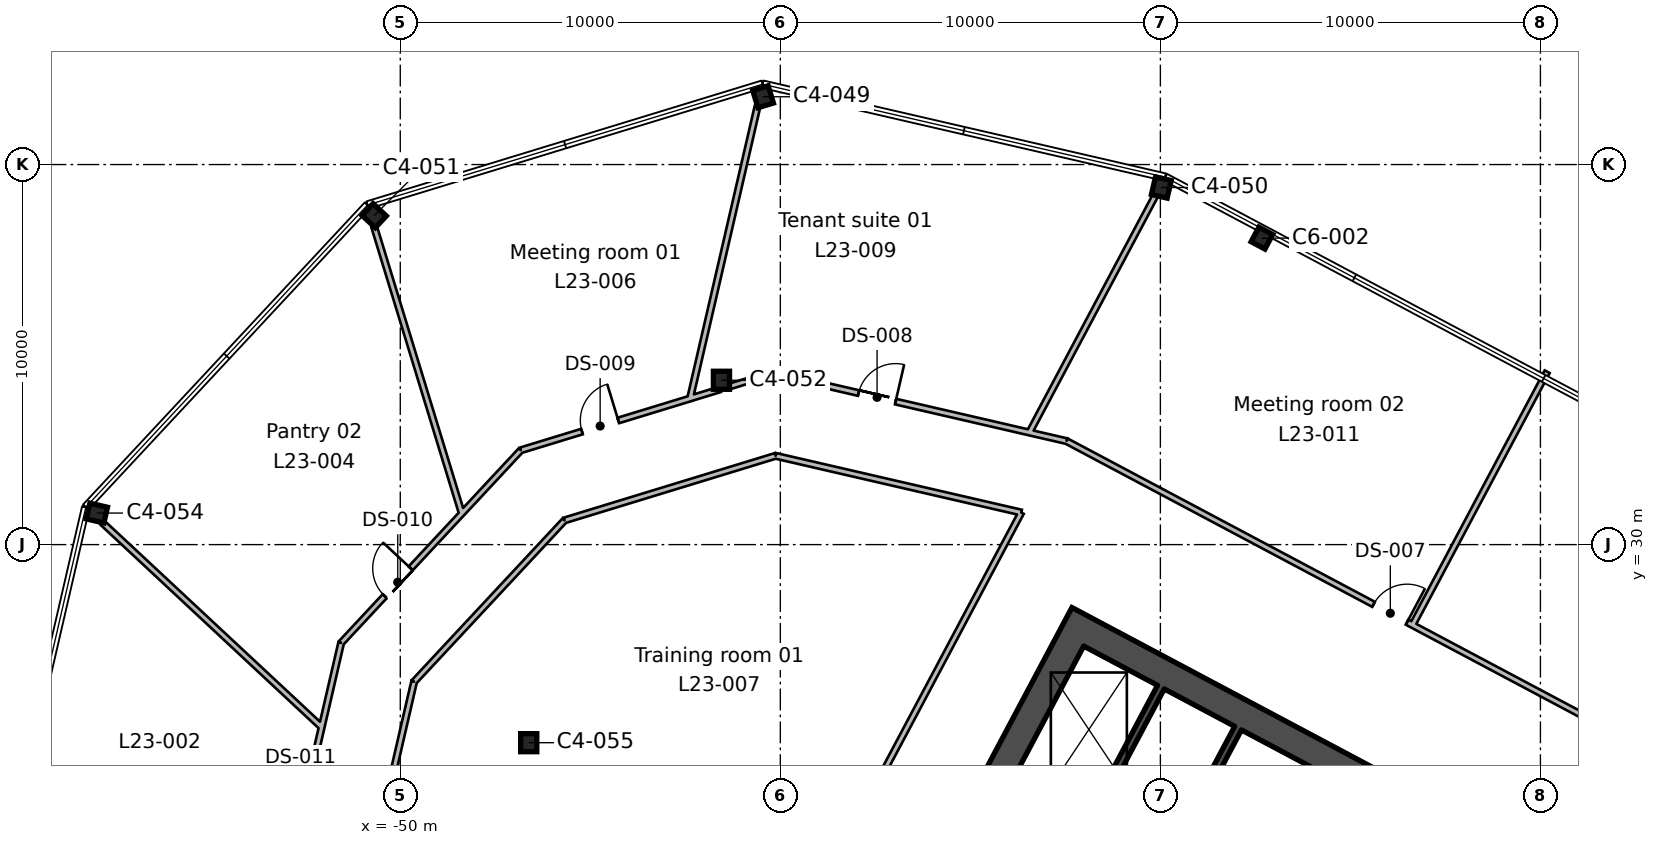
"""IFC4 building model, lengths in metres.
Left out: names, types, materials, properties, quantities, classifications, styles, units other than length and angle.
Written with IfcOpenShell. Run it as: python <this file> out.ifc"""

import sys

from ifc_helpers import new_model, si_unit, direction, frame, frame_2d, origin, origin_2d, place, context, subcontext, project, spatial, rectangle, i_section, extrude, element, fill, save


model = new_model("IFC4")
c1 = context("Model", 3, precision=1e-05, world=origin(), true_north=direction((0.0, 1.0)))
c2 = subcontext(c1, "Body", "Model", "MODEL_VIEW")
j1 = project(units=[si_unit("LENGTHUNIT", "METRE"), si_unit("PLANEANGLEUNIT", "RADIAN")], contexts=[c1])
p1 = place(None, origin())
s1 = spatial("IfcSite", under=j1, at=p1, CompositionType="ELEMENT")
p2 = place(p1, origin())
s2 = spatial("IfcBuilding", under=s1, at=p2, CompositionType="ELEMENT")
p3 = place(p2, frame((0.0, 0.0, 118.2)))
s3 = spatial("IfcBuildingStorey", under=s2, at=p3, CompositionType="ELEMENT", Elevation=118.2)
for number, where, z_axis, x_axis in (
    (1, (-46.62, 24.788, 0.0), (0.0, 0.0, 1.0), (1.0, 0.0, 0.0)),
    (2, (-57.983, 30.83, 0.0), (0.0, 0.0, 1.0), (-0.225, -0.974, 0.0)),
    (3, (-41.549, 34.324, 0.0), (0.0, 0.0, 1.0), (1.0, 0.0, 0.0)),
):
    element("IfcColumn", number, at=place(p3, frame(where, z_axis=z_axis, x_axis=x_axis)), inside=s3, PredefinedType="COLUMN", context=c2, shape_type="SweptSolid", body=[
        extrude(i_section(OverallWidth=0.424, OverallDepth=0.475, WebThickness=0.048, FlangeThickness=0.077, FilletRadius=0.015, at=origin_2d()), origin(), (0.0, 0.0, 1.0), 4.0),
    ])
p4 = place(p3, frame((-27.328, 38.065, 0.0), z_axis=(0.0, 0.0, 1.0), x_axis=(-0.882947592859, 0.469471562786, 0.0)))
e4 = element("IfcColumn", 4, at=p4, inside=s3, PredefinedType="COLUMN", context=c2, shape_type="SweptSolid", body=[
    extrude(i_section(OverallWidth=0.412, OverallDepth=0.434, WebThickness=0.036, FlangeThickness=0.057, FilletRadius=0.015, at=origin_2d()), origin(), (0.0, 0.0, 1.0), 4.0),
])
for number, where, z_axis, x_axis in (
    (5, (-50.686, 38.655, 0.0), (0.0, 0.0, 1.0), (-0.682, -0.731, 0.0)),
    (6, (-29.975, 39.396, 0.0), (0.0, 0.0, 1.0), (-0.974, 0.225, 0.0)),
    (7, (-40.454, 41.784, 0.0), (0.0, 0.0, 1.0), (-0.956, -0.292, 0.0)),
):
    element("IfcColumn", number, at=place(p3, frame(where, z_axis=z_axis, x_axis=x_axis)), inside=s3, PredefinedType="COLUMN", context=c2, shape_type="SweptSolid", body=[
        extrude(i_section(OverallWidth=0.424, OverallDepth=0.475, WebThickness=0.048, FlangeThickness=0.077, FilletRadius=0.015, at=origin_2d()), origin(), (0.0, 0.0, 1.0), 4.0),
    ])
p5 = place(p3, frame((-31.996, 28.168, 0.0), z_axis=(0.0, 0.0, 1.0), x_axis=(-0.469479580143, -0.882943329908, 0.0)))
e8 = element("IfcWall", 8, at=p5, inside=s3, PredefinedType="SHEAR", context=c2, shape_type="SweptSolid", body=[
    extrude(rectangle(XDim=19.7, YDim=0.75, at=frame_2d((9.85, 0.0))), origin(), (0.0, 0.0, 1.0), 4.0),
])
p6 = place(p5, frame((10.45, 0.0, 0.0)))
e9 = element("IfcOpeningElement", 9, at=p6, cuts=e8, PredefinedType="OPENING", context=c2, shape_type="SweptSolid", body=[
    extrude(rectangle(XDim=2.4, YDim=2.4, at=frame_2d((1.2, 1.2))), frame((0.0, 0.385, 0.0), z_axis=(0.0, -1.0, 0.0), x_axis=(1.0, 0.0, 0.0)), (0.0, 0.0, 1.0), 0.77),
])
p7 = place(p3, frame((-14.005, 18.178, 0.0), z_axis=(0.0, 0.0, 1.0), x_axis=(-0.88295010195, 0.469466843842, 0.0)))
e10 = element("IfcWall", 10, at=p7, inside=s3, PredefinedType="SHEAR", context=c2, shape_type="SweptSolid", body=[
    extrude(rectangle(XDim=20.2, YDim=0.75, at=frame_2d((10.1, 0.0))), origin(), (0.0, 0.0, 1.0), 4.0),
])
p8 = place(p3, frame((-27.955, 25.171, 0.0), z_axis=(0.0, 0.0, 1.0), x_axis=(-0.469480409012, -0.88294288918, 0.0)))
e11 = element("IfcWall", 11, at=p8, inside=s3, PredefinedType="SHEAR", context=c2, shape_type="SweptSolid", body=[
    extrude(rectangle(XDim=7.3, YDim=0.2, at=frame_2d((3.65, 0.0))), origin(), (0.0, 0.0, 1.0), 4.0),
])
p9 = place(p3, frame((-29.986, 26.25, 0.0), z_axis=(0.0, 0.0, 1.0), x_axis=(-0.469494272526, -0.882935517501, 0.0)))
e12 = element("IfcWall", 12, at=p9, inside=s3, PredefinedType="SHEAR", context=c2, shape_type="SweptSolid", body=[
    extrude(rectangle(XDim=3.65, YDim=0.2, at=frame_2d((1.825, 0.0))), origin(), (0.0, 0.0, 1.0), 4.0),
])
p10 = place(p3, frame((-57.841, 30.58, 0.0), z_axis=(0.0, 0.0, 1.0), x_axis=(0.731373012185, -0.681977651428, 0.0)))
e13 = element("IfcWall", 13, at=p10, inside=s3, PredefinedType="PARTITIONING", context=c2, shape_type="SweptSolid", body=[
    extrude(rectangle(XDim=7.893, YDim=0.15, at=frame_2d((3.947, 0.0))), origin(), (0.0, 0.0, 1.0), 3.64),
])
p11 = place(p3, frame((-52.056, 25.246, 0.0), z_axis=(0.0, 0.0, 1.0), x_axis=(-0.224961765576, -0.97436759184, 0.0)))
e14 = element("IfcWall", 14, at=p11, inside=s3, PredefinedType="PARTITIONING", context=c2, shape_type="SweptSolid", body=[
    extrude(rectangle(XDim=4.708, YDim=0.15, at=frame_2d((2.354, 0.0))), origin(), (0.0, 0.0, 1.0), 3.64),
])
p12 = place(p11, frame((2.024, 0.0, 0.0)))
e15 = element("IfcOpeningElement", 15, at=p12, cuts=e14, PredefinedType="OPENING", context=c2, shape_type="SweptSolid", body=[
    extrude(rectangle(XDim=1.0, YDim=2.1, at=frame_2d((0.5, 1.05))), frame((0.0, 0.085, 0.0), z_axis=(0.0, -1.0, 0.0), x_axis=(1.0, 0.0, 0.0)), (0.0, 0.0, 1.0), 0.17),
])
p13 = place(p3, frame((-48.345, 30.856, 0.0), z_axis=(0.0, 0.0, 1.0), x_axis=(-0.682044743799, -0.731310445335, 0.0)))
e16 = element("IfcWall", 16, at=p13, inside=s3, PredefinedType="PARTITIONING", context=c2, shape_type="SweptSolid", body=[
    extrude(rectangle(XDim=4.708, YDim=0.15, at=frame_2d((2.354, 0.0))), origin(), (0.0, 0.0, 1.0), 3.64),
])
p14 = place(p13, frame((2.024, 0.0, 0.0)))
e17 = element("IfcOpeningElement", 17, at=p14, cuts=e16, PredefinedType="OPENING", context=c2, shape_type="SweptSolid", body=[
    extrude(rectangle(XDim=1.0, YDim=2.1, at=frame_2d((0.5, 1.05))), frame((0.0, 0.085, 0.0), z_axis=(0.0, -1.0, 0.0), x_axis=(1.0, 0.0, 0.0)), (0.0, 0.0, 1.0), 0.17),
])
p15 = place(p3, frame((-51.556, 27.413, 0.0), z_axis=(0.0, 0.0, 1.0), x_axis=(-0.225019992363, -0.974354146621, 0.0)))
e18 = element("IfcWall", 18, at=p15, inside=s3, PredefinedType="PARTITIONING", context=c2, shape_type="SweptSolid", body=[
    extrude(rectangle(XDim=2.222, YDim=0.15, at=frame_2d((1.111, 0.0))), origin(), (0.0, 0.0, 1.0), 3.64),
])
p16 = place(p3, frame((-50.688, 38.366, 0.0), z_axis=(0.0, 0.0, 1.0), x_axis=(0.292463739097, -0.956276613388, 0.0)))
e19 = element("IfcWall", 19, at=p16, inside=s3, PredefinedType="PARTITIONING", context=c2, shape_type="SweptSolid", body=[
    extrude(rectangle(XDim=7.892, YDim=0.15, at=frame_2d((3.946, 0.0))), origin(), (0.0, 0.0, 1.0), 3.64),
])
p17 = place(p3, frame((-42.326, 33.858, 0.0), z_axis=(0.0, 0.0, 1.0), x_axis=(-0.956351168554, -0.292219852858, 0.0)))
e20 = element("IfcWall", 20, at=p17, inside=s3, PredefinedType="PARTITIONING", context=c2, shape_type="SweptSolid", body=[
    extrude(rectangle(XDim=4.709, YDim=0.15, at=frame_2d((2.354, 0.0))), origin(), (0.0, 0.0, 1.0), 3.64),
])
p18 = place(p17, frame((2.025, 0.0, 0.0)))
e21 = element("IfcOpeningElement", 21, at=p18, cuts=e20, PredefinedType="OPENING", context=c2, shape_type="SweptSolid", body=[
    extrude(rectangle(XDim=1.0, YDim=2.1, at=frame_2d((0.5, 1.05))), frame((0.0, 0.085, 0.0), z_axis=(0.0, -1.0, 0.0), x_axis=(1.0, 0.0, 0.0)), (0.0, 0.0, 1.0), 0.17),
])
p19 = place(p3, frame((-46.829, 32.482, 0.0), z_axis=(0.0, 0.0, 1.0), x_axis=(-0.681891349178, -0.731453476249, 0.0)))
e22 = element("IfcWall", 22, at=p19, inside=s3, PredefinedType="PARTITIONING", context=c2, shape_type="SweptSolid", body=[
    extrude(rectangle(XDim=2.222, YDim=0.15, at=frame_2d((1.111, 0.0))), origin(), (0.0, 0.0, 1.0), 3.64),
])
p20 = place(p3, frame((-50.942, 20.735, 0.0), z_axis=(0.0, 0.0, 1.0), x_axis=(0.224933214218, 0.974374183331, 0.0)))
e23 = element("IfcWall", 23, at=p20, inside=s3, PredefinedType="PARTITIONING", context=c2, shape_type="SweptSolid", body=[
    extrude(rectangle(XDim=5.806, YDim=0.15, at=frame_2d((2.903, 0.0))), origin(), (0.0, 0.0, 1.0), 3.64),
])
p21 = place(p3, frame((-49.636, 26.392, 0.0), z_axis=(0.0, 0.0, 1.0), x_axis=(0.681967545176, 0.731382435752, 0.0)))
e24 = element("IfcWall", 24, at=p21, inside=s3, PredefinedType="PARTITIONING", context=c2, shape_type="SweptSolid", body=[
    extrude(rectangle(XDim=5.805, YDim=0.15, at=frame_2d((2.903, 0.0))), origin(), (0.0, 0.0, 1.0), 3.64),
])
p22 = place(p3, frame((-45.677, 30.638, 0.0), z_axis=(0.0, 0.0, 1.0), x_axis=(0.956291169849, 0.292416139208, 0.0)))
e25 = element("IfcWall", 25, at=p22, inside=s3, PredefinedType="PARTITIONING", context=c2, shape_type="SweptSolid", body=[
    extrude(rectangle(XDim=5.807, YDim=0.15, at=frame_2d((2.903, 0.0))), origin(), (0.0, 0.0, 1.0), 3.64),
])
p23 = place(p3, frame((-40.124, 32.336, 0.0), z_axis=(0.0, 0.0, 1.0), x_axis=(0.974383752234, -0.224891759259, 0.0)))
e26 = element("IfcWall", 26, at=p23, inside=s3, PredefinedType="PARTITIONING", context=c2, shape_type="SweptSolid", body=[
    extrude(rectangle(XDim=6.634, YDim=0.15, at=frame_2d((3.317, 0.0))), origin(), (0.0, 0.0, 1.0), 3.64),
])
p24 = place(p3, frame((-33.66, 30.844, 0.0), z_axis=(0.0, 0.0, 1.0), x_axis=(-0.469473234242, -0.882946704128, 0.0)))
e27 = element("IfcWall", 27, at=p24, inside=s3, PredefinedType="PARTITIONING", context=c2, shape_type="SweptSolid", body=[
    extrude(rectangle(XDim=22.862, YDim=0.15, at=frame_2d((11.431, 0.0))), origin(), (0.0, 0.0, 1.0), 3.64),
])
p25 = place(p3, frame((-40.599, 41.534, 0.0), z_axis=(0.0, 0.0, 1.0), x_axis=(-0.225013130649, -0.974355731258, 0.0)))
e28 = element("IfcWall", 28, at=p25, inside=s3, PredefinedType="PARTITIONING", context=c2, shape_type="SweptSolid", body=[
    extrude(rectangle(XDim=7.892, YDim=0.15, at=frame_2d((3.946, 0.0))), origin(), (0.0, 0.0, 1.0), 3.64),
])
p26 = place(p3, frame((-34.677, 33.234, 0.0), z_axis=(0.0, 0.0, 1.0), x_axis=(-0.974367234575, 0.224963312978, 0.0)))
e29 = element("IfcWall", 29, at=p26, inside=s3, PredefinedType="PARTITIONING", context=c2, shape_type="SweptSolid", body=[
    extrude(rectangle(XDim=5.668, YDim=0.15, at=frame_2d((2.834, 0.0))), origin(), (0.0, 0.0, 1.0), 3.64),
])
p27 = place(p26, frame((2.35, 0.0, 0.0)))
e30 = element("IfcOpeningElement", 30, at=p27, cuts=e29, PredefinedType="OPENING", context=c2, shape_type="SweptSolid", body=[
    extrude(rectangle(XDim=1.0, YDim=2.1, at=frame_2d((0.5, 1.05))), frame((0.0, 0.085, 0.0), z_axis=(0.0, -1.0, 0.0), x_axis=(1.0, 0.0, 0.0)), (0.0, 0.0, 1.0), 0.17),
])
p28 = place(p3, frame((-40.2, 34.509, 0.0), z_axis=(0.0, 0.0, 1.0), x_axis=(-0.956177669283, -0.29278706386, 0.0)))
e31 = element("IfcWall", 31, at=p28, inside=s3, PredefinedType="PARTITIONING", context=c2, shape_type="SweptSolid", body=[
    extrude(rectangle(XDim=1.189, YDim=0.15, at=frame_2d((0.594, 0.0))), origin(), (0.0, 0.0, 1.0), 3.64),
])
p29 = place(p3, frame((-41.582, 34.087, 0.0), z_axis=(0.0, 0.0, 1.0), x_axis=(-0.956187735772, -0.292754186919, 0.0)))
e32 = element("IfcWall", 32, at=p29, inside=s3, PredefinedType="PARTITIONING", context=c2, shape_type="SweptSolid", body=[
    extrude(rectangle(XDim=0.799, YDim=0.15, at=frame_2d((0.399, 0.0))), origin(), (0.0, 0.0, 1.0), 3.64),
])
p30 = place(p3, frame((-34.677, 33.234, 0.0), z_axis=(0.0, 0.0, 1.0), x_axis=(0.974222435733, -0.22558955143, 0.0)))
e33 = element("IfcWall", 33, at=p30, inside=s3, PredefinedType="PARTITIONING", context=c2, shape_type="SweptSolid", body=[
    extrude(rectangle(XDim=1.294, YDim=0.15, at=frame_2d((0.647, 0.0))), origin(), (0.0, 0.0, 1.0), 3.64),
])
p31 = place(p3, frame((-30.129, 39.188, 0.0), z_axis=(0.0, 0.0, 1.0), x_axis=(-0.469506376509, -0.882929081194, 0.0)))
e34 = element("IfcWall", 34, at=p31, inside=s3, PredefinedType="PARTITIONING", context=c2, shape_type="SweptSolid", body=[
    extrude(rectangle(XDim=7.065, YDim=0.15, at=frame_2d((3.533, 0.0))), origin(), (0.0, 0.0, 1.0), 3.64),
])
p32 = place(p3, frame((-32.47, 32.724, 0.0), z_axis=(0.0, 0.0, 1.0), x_axis=(-0.974513968147, 0.224326828281, 0.0)))
e35 = element("IfcWall", 35, at=p32, inside=s3, PredefinedType="PARTITIONING", context=c2, shape_type="SweptSolid", body=[
    extrude(rectangle(XDim=0.971, YDim=0.15, at=frame_2d((0.485, 0.0))), origin(), (0.0, 0.0, 1.0), 3.64),
])
p33 = place(p3, frame((-32.47, 32.724, 0.0), z_axis=(0.0, 0.0, 1.0), x_axis=(0.88295243426, -0.469462457321, 0.0)))
e36 = element("IfcWall", 36, at=p33, inside=s3, PredefinedType="PARTITIONING", context=c2, shape_type="SweptSolid", body=[
    extrude(rectangle(XDim=36.774, YDim=0.15, at=frame_2d((18.387, 0.0))), origin(), (0.0, 0.0, 1.0), 3.64),
])
p34 = place(p33, frame((17.45, 0.0, 0.0)))
e37 = element("IfcOpeningElement", 37, at=p34, cuts=e36, PredefinedType="OPENING", context=c2, shape_type="SweptSolid", body=[
    extrude(rectangle(XDim=1.8, YDim=2.1, at=frame_2d((0.9, 1.05))), frame((0.0, 0.085, 0.0), z_axis=(0.0, -1.0, 0.0), x_axis=(1.0, 0.0, 0.0)), (0.0, 0.0, 1.0), 0.17),
])
p35 = place(p33, frame((9.15, 0.0, 0.0)))
e38 = element("IfcOpeningElement", 38, at=p35, cuts=e36, PredefinedType="OPENING", context=c2, shape_type="SweptSolid", body=[
    extrude(rectangle(XDim=1.0, YDim=2.1, at=frame_2d((0.5, 1.05))), frame((0.0, 0.085, 0.0), z_axis=(0.0, -1.0, 0.0), x_axis=(1.0, 0.0, 0.0)), (0.0, 0.0, 1.0), 0.17),
])
p36 = place(p3, frame((-19.822, 34.55, 0.0), z_axis=(0.0, 0.0, 1.0), x_axis=(-0.469426325488, -0.88297164447, 0.0)))
e39 = element("IfcWall", 39, at=p36, inside=s3, PredefinedType="PARTITIONING", context=c2, shape_type="SweptSolid", body=[
    extrude(rectangle(XDim=7.55, YDim=0.15, at=frame_2d((3.775, 0.0))), origin(), (0.0, 0.0, 1.0), 3.64),
])
p37 = place(p35, origin())
e40 = element("IfcDoor", 40, at=p37, inside=s3, OperationType="SINGLE_SWING_RIGHT", PredefinedType="DOOR", context=c2, shape_type="SweptSolid", body=[
    extrude(rectangle(XDim=1.0, YDim=2.1, at=frame_2d((0.5, 1.05))), frame((0.0, 0.025, 0.0), z_axis=(0.0, -1.0, 0.0), x_axis=(1.0, 0.0, 0.0)), (0.0, 0.0, 1.0), 0.05),
])
fill(e38, e40)
p38 = place(p27, frame((1.0, 0.0, 0.0), z_axis=(0.0, 0.0, 1.0), x_axis=(-1.0, 0.0, 0.0)))
e41 = element("IfcDoor", 41, at=p38, inside=s3, OperationType="SINGLE_SWING_RIGHT", PredefinedType="DOOR", context=c2, shape_type="SweptSolid", body=[
    extrude(rectangle(XDim=1.0, YDim=2.1, at=frame_2d((0.5, 1.05))), frame((0.0, 0.025, 0.0), z_axis=(0.0, -1.0, 0.0), x_axis=(1.0, 0.0, 0.0)), (0.0, 0.0, 1.0), 0.05),
])
fill(e30, e41)
p39 = place(p18, frame((1.0, 0.0, 0.0), z_axis=(0.0, 0.0, 1.0), x_axis=(-1.0, 0.0, 0.0)))
e42 = element("IfcDoor", 42, at=p39, inside=s3, OperationType="SINGLE_SWING_RIGHT", PredefinedType="DOOR", context=c2, shape_type="SweptSolid", body=[
    extrude(rectangle(XDim=1.0, YDim=2.1, at=frame_2d((0.5, 1.05))), frame((0.0, 0.025, 0.0), z_axis=(0.0, -1.0, 0.0), x_axis=(1.0, 0.0, 0.0)), (0.0, 0.0, 1.0), 0.05),
])
fill(e21, e42)
p40 = place(p14, frame((1.0, 0.0, 0.0), z_axis=(0.0, 0.0, 1.0), x_axis=(-1.0, 0.0, 0.0)))
e43 = element("IfcDoor", 43, at=p40, inside=s3, OperationType="SINGLE_SWING_RIGHT", PredefinedType="DOOR", context=c2, shape_type="SweptSolid", body=[
    extrude(rectangle(XDim=1.0, YDim=2.1, at=frame_2d((0.5, 1.05))), frame((0.0, 0.025, 0.0), z_axis=(0.0, -1.0, 0.0), x_axis=(1.0, 0.0, 0.0)), (0.0, 0.0, 1.0), 0.05),
])
fill(e17, e43)
save(model, sys.argv[1])
